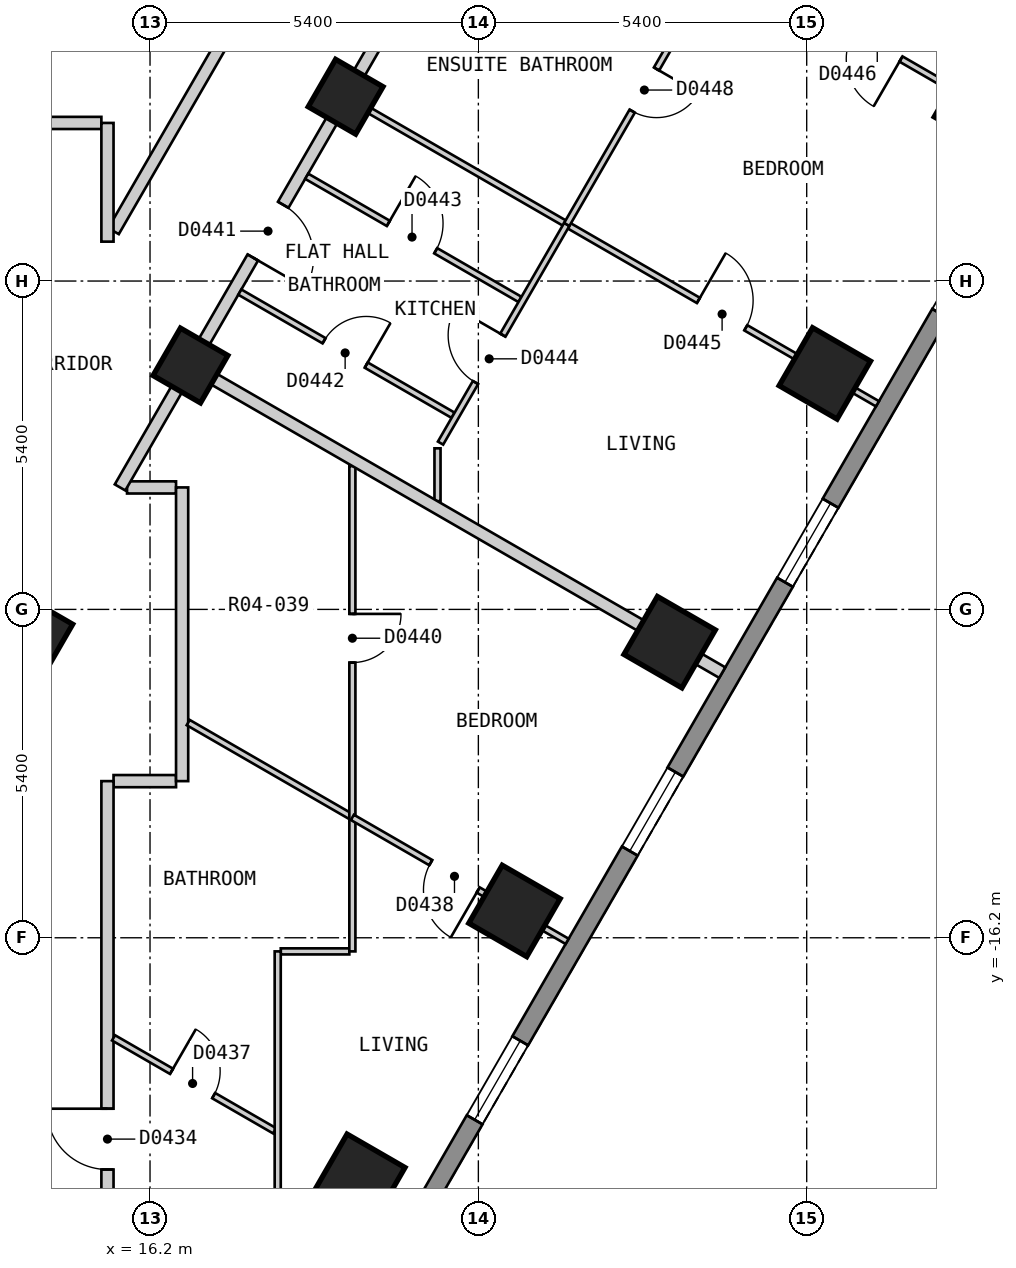
"""IFC4 building model, lengths in metres.
Left out: names, types, materials, properties, quantities, classifications, styles, units other than length and angle.
Written with IfcOpenShell. Run it as: python <this file> out.ifc"""

import sys

from ifc_helpers import new_model, si_unit, direction, frame, frame_2d, origin, origin_2d, place, context, subcontext, project, spatial, polyline, rectangle, outline, extrude, element, fill, save


model = new_model("IFC4")
c1 = context("Model", 3, precision=1e-05, world=origin(), true_north=direction((0.0, 1.0)))
c2 = subcontext(c1, "Body", "Model", "MODEL_VIEW")
j1 = project(units=[si_unit("LENGTHUNIT", "METRE"), si_unit("PLANEANGLEUNIT", "RADIAN")], contexts=[c1])
p1 = place(None, origin())
s1 = spatial("IfcSite", under=j1, at=p1, CompositionType="ELEMENT")
p2 = place(p1, origin())
s2 = spatial("IfcBuilding", under=s1, at=p2, CompositionType="ELEMENT")
p3 = place(p2, frame((0.0, 0.0, 26.4)))
s3 = spatial("IfcBuildingStorey", under=s2, at=p3, CompositionType="ELEMENT", Elevation=26.4)
for number, where, z_axis, x_axis in (
    (1, (19.642, -20.18, 0.0), (0.0, 0.0, 1.0), (0.5, 0.866, 0.0)),
    (2, (22.194, -15.759, 0.0), (0.0, 0.0, 1.0), (0.5, 0.866, 0.0)),
    (3, (24.746, -11.339, 0.0), (0.0, 0.0, 1.0), (0.5, 0.866, 0.0)),
    (4, (27.298, -6.919, 0.0), (0.0, 0.0, 1.0), (0.5, 0.866, 0.0)),
    (5, (29.849, -2.499, 0.0), (0.0, 0.0, 1.0), (0.5, 0.866, 0.0)),
):
    element("IfcColumn", number, at=place(p3, frame(where, z_axis=z_axis, x_axis=x_axis)), inside=s3, PredefinedType="COLUMN", context=c2, shape_type="SweptSolid", body=[
        extrude(rectangle(XDim=1.1, YDim=1.1, at=origin_2d()), origin(), (0.0, 0.0, 1.0), 3.0),
    ])
for number, where, z_axis, x_axis in (
    (6, (14.313, -11.209, 0.0), (0.0, 0.0, 1.0), (0.5, 0.866, 0.0)),
    (7, (16.865, -6.789, 0.0), (0.0, 0.0, 1.0), (0.5, 0.866, 0.0)),
    (8, (19.417, -2.369, 0.0), (0.0, 0.0, 1.0), (0.5, 0.866, 0.0)),
):
    element("IfcColumn", number, at=place(p3, frame(where, z_axis=z_axis, x_axis=x_axis)), inside=s3, PredefinedType="COLUMN", context=c2, shape_type="SweptSolid", body=[
        extrude(rectangle(XDim=0.9, YDim=0.9, at=origin_2d()), origin(), (0.0, 0.0, 1.0), 3.0),
    ])
p4 = place(p3, frame((17.71, -25.825, 0.0), z_axis=(0.0, 0.0, 1.0), x_axis=(0.500001938803, 0.866024284413, 0.0)))
e9 = element("IfcWall", 9, at=p4, inside=s3, PredefinedType="SOLIDWALL", context=c2, shape_type="SweptSolid", body=[
    extrude(outline(polyline([(0.0, -0.15), (27.02, -0.15), (26.94, 0.15), (0.08, 0.15), (0.0, -0.15)])), origin(), (0.0, 0.0, 1.0), 2.7),
])
p5 = place(p4, frame((2.553, 0.0, 0.15)))
e10 = element("IfcOpeningElement", 10, at=p5, cuts=e9, PredefinedType="OPENING", context=c2, shape_type="SweptSolid", body=[
    extrude(rectangle(XDim=1.5, YDim=2.1, at=frame_2d((0.75, 1.05))), frame((0.0, 0.16, 0.0), z_axis=(0.0, -1.0, 0.0), x_axis=(1.0, 0.0, 0.0)), (0.0, 0.0, 1.0), 0.32),
])
p6 = place(p4, frame((7.658, 0.0, 0.15)))
e11 = element("IfcOpeningElement", 11, at=p6, cuts=e9, PredefinedType="OPENING", context=c2, shape_type="SweptSolid", body=[
    extrude(rectangle(XDim=1.5, YDim=2.1, at=frame_2d((0.75, 1.05))), frame((0.0, 0.16, 0.0), z_axis=(0.0, -1.0, 0.0), x_axis=(1.0, 0.0, 0.0)), (0.0, 0.0, 1.0), 0.32),
])
p7 = place(p4, frame((12.761, 0.0, 0.15)))
e12 = element("IfcOpeningElement", 12, at=p7, cuts=e9, PredefinedType="OPENING", context=c2, shape_type="SweptSolid", body=[
    extrude(rectangle(XDim=1.5, YDim=2.1, at=frame_2d((0.75, 1.05))), frame((0.0, 0.16, 0.0), z_axis=(0.0, -1.0, 0.0), x_axis=(1.0, 0.0, 0.0)), (0.0, 0.0, 1.0), 0.32),
])
p8 = place(p4, frame((17.865, 0.0, 0.15)))
e13 = element("IfcOpeningElement", 13, at=p8, cuts=e9, PredefinedType="OPENING", context=c2, shape_type="SweptSolid", body=[
    extrude(rectangle(XDim=1.5, YDim=2.1, at=frame_2d((0.75, 1.05))), frame((0.0, 0.16, 0.0), z_axis=(0.0, -1.0, 0.0), x_axis=(1.0, 0.0, 0.0)), (0.0, 0.0, 1.0), 0.32),
])
p9 = place(p4, frame((22.969, 0.0, 0.15)))
e14 = element("IfcOpeningElement", 14, at=p9, cuts=e9, PredefinedType="OPENING", context=c2, shape_type="SweptSolid", body=[
    extrude(rectangle(XDim=1.5, YDim=2.1, at=frame_2d((0.75, 1.05))), frame((0.0, 0.16, 0.0), z_axis=(0.0, -1.0, 0.0), x_axis=(1.0, 0.0, 0.0)), (0.0, 0.0, 1.0), 0.32),
])
p10 = place(p3, frame((15.822, -8.794, 0.0), z_axis=(0.0, 0.0, 1.0), x_axis=(1.0, 0.0, 0.0)))
e15 = element("IfcWall", 15, at=p10, inside=s3, PredefinedType="PARTITIONING", context=c2, shape_type="SweptSolid", body=[
    extrude(rectangle(XDim=0.806, YDim=0.2, at=frame_2d((0.403, 0.0))), origin(), (0.0, 0.0, 1.0), 2.7),
])
p11 = place(p3, frame((15.6, -13.624, 0.0), z_axis=(0.0, 0.0, 1.0), x_axis=(1.0, 0.0, 0.0)))
e16 = element("IfcWall", 16, at=p11, inside=s3, PredefinedType="PARTITIONING", context=c2, shape_type="SweptSolid", body=[
    extrude(rectangle(XDim=1.028, YDim=0.2, at=frame_2d((0.514, 0.0))), origin(), (0.0, 0.0, 1.0), 2.7),
])
p12 = place(p3, frame((7.028, -2.8, 0.0), z_axis=(0.0, 0.0, 1.0), x_axis=(1.0, 0.0, 0.0)))
e17 = element("IfcWall", 17, at=p12, inside=s3, PredefinedType="PARTITIONING", context=c2, shape_type="SweptSolid", body=[
    extrude(rectangle(XDim=8.372, YDim=0.2, at=frame_2d((4.186, 0.0))), origin(), (0.0, 0.0, 1.0), 2.7),
])
p13 = place(p3, frame((15.6, -4.579, 0.0), z_axis=(0.0, 0.0, 1.0), x_axis=(0.499927597274, 0.866067201483, 0.0)))
e18 = element("IfcWall", 18, at=p13, inside=s3, PredefinedType="PARTITIONING", context=c2, shape_type="SweptSolid", body=[
    extrude(rectangle(XDim=5.288, YDim=0.2, at=frame_2d((2.644, 0.0))), origin(), (0.0, 0.0, 1.0), 2.7),
])
p14 = place(p3, frame((15.707, -8.794, 0.0), z_axis=(0.0, 0.0, 1.0), x_axis=(0.500016151272, 0.866016078642, 0.0)))
e19 = element("IfcWall", 19, at=p14, inside=s3, PredefinedType="PARTITIONING", context=c2, shape_type="SweptSolid", body=[
    extrude(rectangle(XDim=10.098, YDim=0.2, at=frame_2d((5.049, 0.0))), origin(), (0.0, 0.0, 1.0), 2.7),
])
p15 = place(p14, frame((4.367, 0.0, 0.0)))
e20 = element("IfcOpeningElement", 20, at=p15, cuts=e19, PredefinedType="OPENING", context=c2, shape_type="SweptSolid", body=[
    extrude(rectangle(XDim=1.0, YDim=2.1, at=frame_2d((0.5, 1.05))), frame((0.0, 0.11, 0.0), z_axis=(0.0, -1.0, 0.0), x_axis=(1.0, 0.0, 0.0)), (0.0, 0.0, 1.0), 0.22),
])
p16 = place(p3, frame((15.5, -21.199, 0.0), z_axis=(0.0, 0.0, 1.0), x_axis=(0.0, 1.0, 0.0)))
e21 = element("IfcWall", 21, at=p16, inside=s3, PredefinedType="PARTITIONING", context=c2, shape_type="SweptSolid", body=[
    extrude(rectangle(XDim=7.575, YDim=0.2, at=frame_2d((3.788, 0.0))), origin(), (0.0, 0.0, 1.0), 2.7),
])
p17 = place(p16, frame((1.188, 0.0, 0.0)))
e22 = element("IfcOpeningElement", 22, at=p17, cuts=e21, PredefinedType="OPENING", context=c2, shape_type="SweptSolid", body=[
    extrude(rectangle(XDim=1.0, YDim=2.1, at=frame_2d((0.5, 1.05))), frame((0.0, 0.11, 0.0), z_axis=(0.0, -1.0, 0.0), x_axis=(1.0, 0.0, 0.0)), (0.0, 0.0, 1.0), 0.22),
])
p18 = place(p3, frame((15.5, -4.752, 0.0), z_axis=(0.0, 0.0, 1.0), x_axis=(0.0, 1.0, 0.0)))
e23 = element("IfcWall", 23, at=p18, inside=s3, PredefinedType="PARTITIONING", context=c2, shape_type="SweptSolid", body=[
    extrude(rectangle(XDim=1.952, YDim=0.2, at=frame_2d((0.976, 0.0))), origin(), (0.0, 0.0, 1.0), 2.7),
])
p19 = place(p3, frame((16.728, -13.624, 0.0), z_axis=(0.0, 0.0, 1.0), x_axis=(0.0, 1.0, 0.0)))
e24 = element("IfcWall", 24, at=p19, inside=s3, PredefinedType="PARTITIONING", context=c2, shape_type="SweptSolid", body=[
    extrude(rectangle(XDim=4.83, YDim=0.2, at=frame_2d((2.415, 0.0))), origin(), (0.0, 0.0, 1.0), 2.7),
])
p20 = place(p3, frame((15.6, -17.846, 0.0), z_axis=(0.0, 0.0, 1.0), x_axis=(0.866148385016, -0.499786929736, 0.0)))
e25 = element("IfcWall", 25, at=p20, inside=s3, PredefinedType="PARTITIONING", context=c2, shape_type="SweptSolid", body=[
    extrude(rectangle(XDim=3.059, YDim=0.1, at=frame_2d((1.53, 0.0))), origin(), (0.0, 0.0, 1.0), 2.7),
])
p21 = place(p20, frame((1.101, 0.0, 0.0)))
e26 = element("IfcOpeningElement", 26, at=p21, cuts=e25, PredefinedType="OPENING", context=c2, shape_type="SweptSolid", body=[
    extrude(rectangle(XDim=0.8, YDim=2.1, at=frame_2d((0.4, 1.05))), frame((0.0, 0.06, 0.0), z_axis=(0.0, -1.0, 0.0), x_axis=(1.0, 0.0, 0.0)), (0.0, 0.0, 1.0), 0.12),
])
p22 = place(p3, frame((16.828, -12.661, 0.0), z_axis=(0.0, 0.0, 1.0), x_axis=(0.866008246423, -0.500029716244, 0.0)))
e27 = element("IfcWall", 27, at=p22, inside=s3, PredefinedType="PARTITIONING", context=c2, shape_type="SweptSolid", body=[
    extrude(rectangle(XDim=3.118, YDim=0.1, at=frame_2d((1.559, 0.0))), origin(), (0.0, 0.0, 1.0), 2.7),
])
p23 = place(p3, frame((17.677, -5.582, 0.0), z_axis=(0.0, 0.0, 1.0), x_axis=(0.866015917575, -0.500016430238, 0.0)))
e28 = element("IfcWall", 28, at=p23, inside=s3, PredefinedType="PARTITIONING", context=c2, shape_type="SweptSolid", body=[
    extrude(rectangle(XDim=4.05, YDim=0.1, at=frame_2d((2.025, 0.0))), origin(), (0.0, 0.0, 1.0), 2.7),
])
p24 = place(p23, frame((1.6, 0.0, 0.0)))
e29 = element("IfcOpeningElement", 29, at=p24, cuts=e28, PredefinedType="OPENING", context=c2, shape_type="SweptSolid", body=[
    extrude(rectangle(XDim=0.8, YDim=2.1, at=frame_2d((0.4, 1.05))), frame((0.0, 0.06, 0.0), z_axis=(0.0, -1.0, 0.0), x_axis=(1.0, 0.0, 0.0)), (0.0, 0.0, 1.0), 0.12),
])
p25 = place(p3, frame((18.777, -3.677, 0.0), z_axis=(0.0, 0.0, 1.0), x_axis=(0.866000843773, -0.500042536776, 0.0)))
e30 = element("IfcWall", 30, at=p25, inside=s3, PredefinedType="PARTITIONING", context=c2, shape_type="SweptSolid", body=[
    extrude(rectangle(XDim=4.05, YDim=0.1, at=frame_2d((2.025, 0.0))), origin(), (0.0, 0.0, 1.0), 2.7),
])
p26 = place(p25, frame((1.55, 0.0, 0.0)))
e31 = element("IfcOpeningElement", 31, at=p26, cuts=e30, PredefinedType="OPENING", context=c2, shape_type="SweptSolid", body=[
    extrude(rectangle(XDim=0.9, YDim=2.1, at=frame_2d((0.45, 1.05))), frame((0.0, 0.06, 0.0), z_axis=(0.0, -1.0, 0.0), x_axis=(1.0, 0.0, 0.0)), (0.0, 0.0, 1.0), 0.12),
])
p27 = place(p3, frame((19.503, -2.419, 0.0), z_axis=(0.0, 0.0, 1.0), x_axis=(0.866047370643, -0.499961950354, 0.0)))
e32 = element("IfcWall", 32, at=p27, inside=s3, PredefinedType="PARTITIONING", context=c2, shape_type="SweptSolid", body=[
    extrude(rectangle(XDim=10.001, YDim=0.1, at=frame_2d((5.0, 0.0))), origin(), (0.0, 0.0, 1.0), 2.7),
])
p28 = place(p27, frame((6.6, 0.0, 0.0)))
e33 = element("IfcOpeningElement", 33, at=p28, cuts=e32, PredefinedType="OPENING", context=c2, shape_type="SweptSolid", body=[
    extrude(rectangle(XDim=0.9, YDim=2.1, at=frame_2d((0.45, 1.05))), frame((0.0, 0.06, 0.0), z_axis=(0.0, -1.0, 0.0), x_axis=(1.0, 0.0, 0.0)), (0.0, 0.0, 1.0), 0.12),
])
p29 = place(p3, frame((25.649, -0.074, 0.0), z_axis=(0.0, 0.0, 1.0), x_axis=(0.866059819573, -0.499940385368, 0.0)))
e34 = element("IfcWall", 34, at=p29, inside=s3, PredefinedType="PARTITIONING", context=c2, shape_type="SweptSolid", body=[
    extrude(rectangle(XDim=5.851, YDim=0.1, at=frame_2d((2.925, 0.0))), origin(), (0.0, 0.0, 1.0), 2.7),
])
p30 = place(p29, frame((2.45, 0.0, 0.0)))
e35 = element("IfcOpeningElement", 35, at=p30, cuts=e34, PredefinedType="OPENING", context=c2, shape_type="SweptSolid", body=[
    extrude(rectangle(XDim=0.9, YDim=2.1, at=frame_2d((0.45, 1.05))), frame((0.0, 0.06, 0.0), z_axis=(0.0, -1.0, 0.0), x_axis=(1.0, 0.0, 0.0)), (0.0, 0.0, 1.0), 0.12),
])
p31 = place(p3, frame((18.35, -16.424, 0.0), z_axis=(0.0, 0.0, 1.0), x_axis=(1.0, 0.0, 0.0)))
e36 = element("IfcWall", 36, at=p31, inside=s3, PredefinedType="PARTITIONING", context=c2, shape_type="SweptSolid", body=[
    extrude(rectangle(XDim=1.128, YDim=0.1, at=frame_2d((0.564, 0.0))), origin(), (0.0, 0.0, 1.0), 2.7),
])
p32 = place(p3, frame((20.978, -8.065, 0.0), z_axis=(0.0, 0.0, 1.0), x_axis=(0.499965068118, 0.866045570776, 0.0)))
e37 = element("IfcWall", 37, at=p32, inside=s3, PredefinedType="PARTITIONING", context=c2, shape_type="SweptSolid", body=[
    extrude(rectangle(XDim=4.152, YDim=0.1, at=frame_2d((2.076, 0.0))), origin(), (0.0, 0.0, 1.0), 2.7),
])
p33 = place(p32, frame((1.15, 0.0, 0.0)))
e38 = element("IfcOpeningElement", 38, at=p33, cuts=e37, PredefinedType="OPENING", context=c2, shape_type="SweptSolid", body=[
    extrude(rectangle(XDim=0.9, YDim=2.1, at=frame_2d((0.45, 1.05))), frame((0.0, 0.06, 0.0), z_axis=(0.0, -1.0, 0.0), x_axis=(1.0, 0.0, 0.0)), (0.0, 0.0, 1.0), 0.12),
])
p34 = place(p3, frame((18.3, -24.0, 0.0), z_axis=(0.0, 0.0, 1.0), x_axis=(0.0, 1.0, 0.0)))
e39 = element("IfcWall", 39, at=p34, inside=s3, PredefinedType="PARTITIONING", context=c2, shape_type="SweptSolid", body=[
    extrude(rectangle(XDim=7.576, YDim=0.1, at=frame_2d((3.788, 0.0))), origin(), (0.0, 0.0, 1.0), 2.7),
])
p35 = place(p3, frame((19.528, -16.424, 0.0), z_axis=(0.0, 0.0, 1.0), x_axis=(0.0, 1.0, 0.0)))
e40 = element("IfcWall", 40, at=p35, inside=s3, PredefinedType="PARTITIONING", context=c2, shape_type="SweptSolid", body=[
    extrude(rectangle(XDim=7.982, YDim=0.1, at=frame_2d((3.991, 0.0))), origin(), (0.0, 0.0, 1.0), 2.7),
])
p36 = place(p35, frame((4.75, 0.0, 0.0)))
e41 = element("IfcOpeningElement", 41, at=p36, cuts=e40, PredefinedType="OPENING", context=c2, shape_type="SweptSolid", body=[
    extrude(rectangle(XDim=0.8, YDim=2.1, at=frame_2d((0.4, 1.05))), frame((0.0, 0.06, 0.0), z_axis=(0.0, -1.0, 0.0), x_axis=(1.0, 0.0, 0.0)), (0.0, 0.0, 1.0), 0.12),
])
p37 = place(p3, frame((20.928, -9.02, 0.0), z_axis=(0.0, 0.0, 1.0), x_axis=(0.0, 1.0, 0.0)))
e42 = element("IfcWall", 42, at=p37, inside=s3, PredefinedType="PARTITIONING", context=c2, shape_type="SweptSolid", body=[
    extrude(rectangle(XDim=0.869, YDim=0.1, at=frame_2d((0.435, 0.0))), origin(), (0.0, 0.0, 1.0), 2.7),
])
p38 = place(p3, frame((16.951, -6.839, 0.0), z_axis=(0.0, 0.0, 1.0), x_axis=(0.866022959057, -0.500004234368, 0.0)))
e43 = element("IfcWall", 43, at=p38, inside=s3, PredefinedType="PARTITIONING", context=c2, shape_type="SweptSolid", body=[
    extrude(rectangle(XDim=10.0, YDim=0.2, at=frame_2d((5.0, 0.0))), origin(), (0.0, 0.0, 1.0), 2.7),
])
p39 = place(p3, frame((19.528, -14.22, 0.0), z_axis=(0.0, 0.0, 1.0), x_axis=(0.866039047082, -0.499976368371, 0.0)))
e44 = element("IfcWall", 44, at=p39, inside=s3, PredefinedType="PARTITIONING", context=c2, shape_type="SweptSolid", body=[
    extrude(rectangle(XDim=4.078, YDim=0.1, at=frame_2d((2.039, 0.0))), origin(), (0.0, 0.0, 1.0), 2.7),
])
p40 = place(p39, frame((1.489, 0.0, 0.0)))
e45 = element("IfcOpeningElement", 45, at=p40, cuts=e44, PredefinedType="OPENING", context=c2, shape_type="SweptSolid", body=[
    extrude(rectangle(XDim=0.9, YDim=2.1, at=frame_2d((0.45, 1.05))), frame((0.0, 0.06, 0.0), z_axis=(0.0, -1.0, 0.0), x_axis=(1.0, 0.0, 0.0)), (0.0, 0.0, 1.0), 0.12),
])
p41 = place(p3, frame((23.054, -4.469, 0.0), z_axis=(0.0, 0.0, 1.0), x_axis=(0.500023345639, 0.866011924754, 0.0)))
e46 = element("IfcWall", 46, at=p41, inside=s3, PredefinedType="PARTITIONING", context=c2, shape_type="SweptSolid", body=[
    extrude(rectangle(XDim=5.104, YDim=0.1, at=frame_2d((2.552, 0.0))), origin(), (0.0, 0.0, 1.0), 2.7),
])
p42 = place(p41, frame((2.152, 0.0, 0.0)))
e47 = element("IfcOpeningElement", 47, at=p42, cuts=e46, PredefinedType="OPENING", context=c2, shape_type="SweptSolid", body=[
    extrude(rectangle(XDim=0.8, YDim=2.1, at=frame_2d((0.4, 1.05))), frame((0.0, 0.06, 0.0), z_axis=(0.0, -1.0, 0.0), x_axis=(1.0, 0.0, 0.0)), (0.0, 0.0, 1.0), 0.12),
])
p43 = place(p6, origin())
e48 = element("IfcWindow", 48, at=p43, inside=s3, PartitioningType="SINGLE_PANEL", PredefinedType="WINDOW", context=c2, shape_type="SweptSolid", body=[
    extrude(rectangle(XDim=1.5, YDim=2.1, at=frame_2d((0.75, 1.05))), frame((0.0, 0.03, 0.0), z_axis=(0.0, -1.0, 0.0), x_axis=(1.0, 0.0, 0.0)), (0.0, 0.0, 1.0), 0.06),
])
fill(e11, e48)
p44 = place(p7, origin())
e49 = element("IfcWindow", 49, at=p44, inside=s3, PartitioningType="SINGLE_PANEL", PredefinedType="WINDOW", context=c2, shape_type="SweptSolid", body=[
    extrude(rectangle(XDim=1.5, YDim=2.1, at=frame_2d((0.75, 1.05))), frame((0.0, 0.03, 0.0), z_axis=(0.0, -1.0, 0.0), x_axis=(1.0, 0.0, 0.0)), (0.0, 0.0, 1.0), 0.06),
])
fill(e12, e49)
p45 = place(p8, origin())
e50 = element("IfcWindow", 50, at=p45, inside=s3, PartitioningType="SINGLE_PANEL", PredefinedType="WINDOW", context=c2, shape_type="SweptSolid", body=[
    extrude(rectangle(XDim=1.5, YDim=2.1, at=frame_2d((0.75, 1.05))), frame((0.0, 0.03, 0.0), z_axis=(0.0, -1.0, 0.0), x_axis=(1.0, 0.0, 0.0)), (0.0, 0.0, 1.0), 0.06),
])
fill(e13, e50)
p46 = place(p17, origin())
e51 = element("IfcDoor", 51, at=p46, inside=s3, OperationType="SINGLE_SWING_RIGHT", PredefinedType="DOOR", context=c2, shape_type="SweptSolid", body=[
    extrude(rectangle(XDim=1.0, YDim=2.1, at=frame_2d((0.5, 1.05))), frame((0.0, 0.025, 0.0), z_axis=(0.0, -1.0, 0.0), x_axis=(1.0, 0.0, 0.0)), (0.0, 0.0, 1.0), 0.05),
])
fill(e22, e51)
p47 = place(p21, origin())
e52 = element("IfcDoor", 52, at=p47, inside=s3, OperationType="SINGLE_SWING_LEFT", PredefinedType="DOOR", context=c2, shape_type="SweptSolid", body=[
    extrude(rectangle(XDim=0.8, YDim=2.1, at=frame_2d((0.4, 1.05))), frame((0.0, 0.025, 0.0), z_axis=(0.0, -1.0, 0.0), x_axis=(1.0, 0.0, 0.0)), (0.0, 0.0, 1.0), 0.05),
])
fill(e26, e52)
p48 = place(p40, origin())
e53 = element("IfcDoor", 53, at=p48, inside=s3, OperationType="SINGLE_SWING_RIGHT", PredefinedType="DOOR", context=c2, shape_type="SweptSolid", body=[
    extrude(rectangle(XDim=0.9, YDim=2.1, at=frame_2d((0.45, 1.05))), frame((0.0, 0.025, 0.0), z_axis=(0.0, -1.0, 0.0), x_axis=(1.0, 0.0, 0.0)), (0.0, 0.0, 1.0), 0.05),
])
fill(e45, e53)
p49 = place(p36, origin())
e54 = element("IfcDoor", 54, at=p49, inside=s3, OperationType="SINGLE_SWING_RIGHT", PredefinedType="DOOR", context=c2, shape_type="SweptSolid", body=[
    extrude(rectangle(XDim=0.8, YDim=2.1, at=frame_2d((0.4, 1.05))), frame((0.0, 0.025, 0.0), z_axis=(0.0, -1.0, 0.0), x_axis=(1.0, 0.0, 0.0)), (0.0, 0.0, 1.0), 0.05),
])
fill(e41, e54)
p50 = place(p15, origin())
e55 = element("IfcDoor", 55, at=p50, inside=s3, OperationType="SINGLE_SWING_LEFT", PredefinedType="DOOR", context=c2, shape_type="SweptSolid", body=[
    extrude(rectangle(XDim=1.0, YDim=2.1, at=frame_2d((0.5, 1.05))), frame((0.0, 0.025, 0.0), z_axis=(0.0, -1.0, 0.0), x_axis=(1.0, 0.0, 0.0)), (0.0, 0.0, 1.0), 0.05),
])
fill(e20, e55)
p51 = place(p24, origin())
e56 = element("IfcDoor", 56, at=p51, inside=s3, OperationType="SINGLE_SWING_RIGHT", PredefinedType="DOOR", context=c2, shape_type="SweptSolid", body=[
    extrude(rectangle(XDim=0.8, YDim=2.1, at=frame_2d((0.4, 1.05))), frame((0.0, 0.025, 0.0), z_axis=(0.0, -1.0, 0.0), x_axis=(1.0, 0.0, 0.0)), (0.0, 0.0, 1.0), 0.05),
])
fill(e29, e56)
p52 = place(p26, origin())
e57 = element("IfcDoor", 57, at=p52, inside=s3, OperationType="SINGLE_SWING_LEFT", PredefinedType="DOOR", context=c2, shape_type="SweptSolid", body=[
    extrude(rectangle(XDim=0.9, YDim=2.1, at=frame_2d((0.45, 1.05))), frame((0.0, 0.025, 0.0), z_axis=(0.0, -1.0, 0.0), x_axis=(1.0, 0.0, 0.0)), (0.0, 0.0, 1.0), 0.05),
])
fill(e31, e57)
p53 = place(p33, origin())
e58 = element("IfcDoor", 58, at=p53, inside=s3, OperationType="SINGLE_SWING_RIGHT", PredefinedType="DOOR", context=c2, shape_type="SweptSolid", body=[
    extrude(rectangle(XDim=0.9, YDim=2.1, at=frame_2d((0.45, 1.05))), frame((0.0, 0.025, 0.0), z_axis=(0.0, -1.0, 0.0), x_axis=(1.0, 0.0, 0.0)), (0.0, 0.0, 1.0), 0.05),
])
fill(e38, e58)
p54 = place(p28, origin())
e59 = element("IfcDoor", 59, at=p54, inside=s3, OperationType="SINGLE_SWING_LEFT", PredefinedType="DOOR", context=c2, shape_type="SweptSolid", body=[
    extrude(rectangle(XDim=0.9, YDim=2.1, at=frame_2d((0.45, 1.05))), frame((0.0, 0.025, 0.0), z_axis=(0.0, -1.0, 0.0), x_axis=(1.0, 0.0, 0.0)), (0.0, 0.0, 1.0), 0.05),
])
fill(e33, e59)
p55 = place(p30, origin())
e60 = element("IfcDoor", 60, at=p55, inside=s3, OperationType="SINGLE_SWING_RIGHT", PredefinedType="DOOR", context=c2, shape_type="SweptSolid", body=[
    extrude(rectangle(XDim=0.9, YDim=2.1, at=frame_2d((0.45, 1.05))), frame((0.0, 0.025, 0.0), z_axis=(0.0, -1.0, 0.0), x_axis=(1.0, 0.0, 0.0)), (0.0, 0.0, 1.0), 0.05),
])
fill(e35, e60)
p56 = place(p42, origin())
e61 = element("IfcDoor", 61, at=p56, inside=s3, OperationType="SINGLE_SWING_RIGHT", PredefinedType="DOOR", context=c2, shape_type="SweptSolid", body=[
    extrude(rectangle(XDim=0.8, YDim=2.1, at=frame_2d((0.4, 1.05))), frame((0.0, 0.025, 0.0), z_axis=(0.0, -1.0, 0.0), x_axis=(1.0, 0.0, 0.0)), (0.0, 0.0, 1.0), 0.05),
])
fill(e47, e61)
save(model, sys.argv[1])
